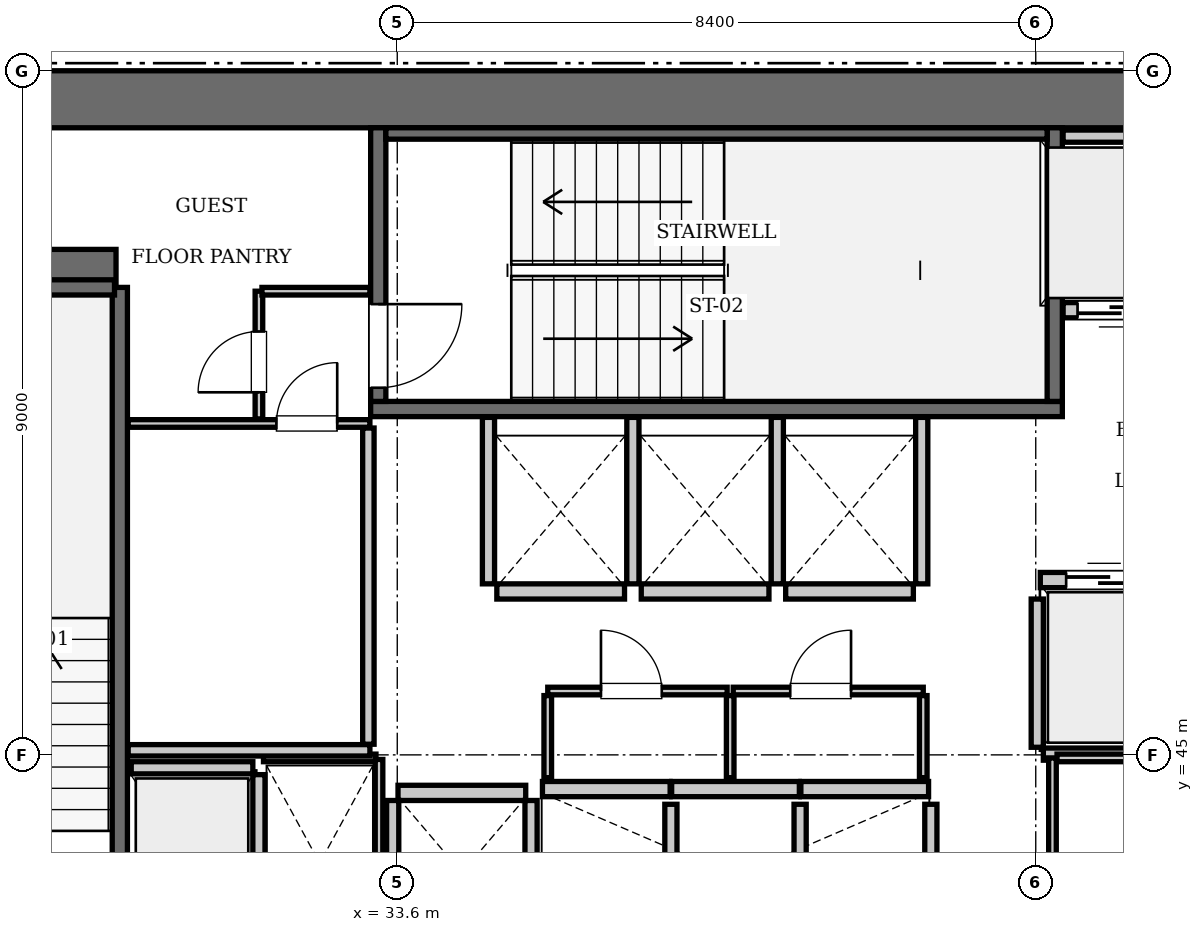
"""IFC4 building model, lengths in metres.
Left out: names, types, materials, properties, quantities, classifications, styles, units other than length and angle.
Written with IfcOpenShell. Run it as: python <this file> out.ifc"""

import sys

from ifc_helpers import new_model, si_unit, direction, frame, frame_2d, origin, place, context, subcontext, project, spatial, rectangle, extrude, element, fill, save


model = new_model("IFC4")
c1 = context("Model", 3, precision=1e-05, world=origin(), true_north=direction((0.0, 1.0)))
c2 = subcontext(c1, "Body", "Model", "MODEL_VIEW")
j1 = project(units=[si_unit("LENGTHUNIT", "METRE"), si_unit("PLANEANGLEUNIT", "RADIAN")], contexts=[c1])
p1 = place(None, origin())
s1 = spatial("IfcSite", under=j1, at=p1, CompositionType="ELEMENT")
p2 = place(p1, origin())
s2 = spatial("IfcBuilding", under=s1, at=p2, CompositionType="ELEMENT")
p3 = place(p2, frame((0.0, 0.0, 169.75)))
s3 = spatial("IfcBuildingStorey", under=s2, at=p3, CompositionType="ELEMENT", Elevation=169.75)
p4 = place(p3, frame((25.2, 53.625, 0.0), z_axis=(0.0, 0.0, 1.0), x_axis=(1.0, 0.0, 0.0)))
e1 = element("IfcWall", 1, at=p4, inside=s3, PredefinedType="SHEAR", context=c2, shape_type="SweptSolid", body=[
    extrude(rectangle(XDim=25.2, YDim=0.75, at=frame_2d((12.6, 0.0))), origin(), (0.0, 0.0, 1.0), 3.85),
])
p5 = place(p3, frame((25.95, 51.4, 0.0), z_axis=(0.0, 0.0, 1.0), x_axis=(1.0, 0.0, 0.0)))
e2 = element("IfcWall", 2, at=p5, inside=s3, PredefinedType="SHEAR", context=c2, shape_type="SweptSolid", body=[
    extrude(rectangle(XDim=3.95, YDim=0.5, at=frame_2d((1.975, 0.0))), origin(), (0.0, 0.0, 1.0), 3.85),
])
p6 = place(p3, frame((29.95, 42.15, 0.0), z_axis=(0.0, 0.0, 1.0), x_axis=(0.0, 1.0, 0.0)))
e3 = element("IfcWall", 3, at=p6, inside=s3, PredefinedType="SOLIDWALL", context=c2, shape_type="SweptSolid", body=[
    extrude(rectangle(XDim=9.0, YDim=0.2, at=frame_2d((4.5, 0.0))), origin(), (0.0, 0.0, 1.0), 3.61),
])
p7 = place(p3, frame((26.38, 51.15, 0.0), z_axis=(0.0, 0.0, 1.0), x_axis=(1.0, 0.0, 0.0)))
e4 = element("IfcWall", 4, at=p7, inside=s3, PredefinedType="SOLIDWALL", context=c2, shape_type="SweptSolid", body=[
    extrude(rectangle(XDim=3.5, YDim=0.2, at=frame_2d((1.75, 0.0))), origin(), (0.0, 0.0, 1.0), 3.61),
])
p8 = place(p3, frame((33.25, 49.55, 0.0), z_axis=(0.0, 0.0, 1.0), x_axis=(1.0, 0.0, 0.0)))
e5 = element("IfcWall", 5, at=p8, inside=s3, PredefinedType="SOLIDWALL", context=c2, shape_type="SweptSolid", body=[
    extrude(rectangle(XDim=9.1, YDim=0.2, at=frame_2d((4.55, 0.0))), origin(), (0.0, 0.0, 1.0), 3.61),
])
p9 = place(p3, frame((42.25, 49.65, 0.0), z_axis=(0.0, 0.0, 1.0), x_axis=(0.0, 1.0, 0.0)))
e6 = element("IfcWall", 6, at=p9, inside=s3, PredefinedType="SOLIDWALL", context=c2, shape_type="SweptSolid", body=[
    extrude(rectangle(XDim=3.6, YDim=0.2, at=frame_2d((1.8, 0.0))), origin(), (0.0, 0.0, 1.0), 3.61),
])
p10 = place(p3, frame((33.35, 49.65, 0.0), z_axis=(0.0, 0.0, 1.0), x_axis=(0.0, 1.0, 0.0)))
e7 = element("IfcWall", 7, at=p10, inside=s3, PredefinedType="SOLIDWALL", context=c2, shape_type="SweptSolid", body=[
    extrude(rectangle(XDim=3.6, YDim=0.2, at=frame_2d((1.8, 0.0))), origin(), (0.0, 0.0, 1.0), 3.61),
])
p11 = place(p10, frame((0.18, 0.0, 0.0)))
e8 = element("IfcOpeningElement", 8, at=p11, cuts=e7, PredefinedType="OPENING", context=c2, shape_type="SweptSolid", body=[
    extrude(rectangle(XDim=1.1, YDim=2.15, at=frame_2d((0.55, 1.075))), frame((0.0, 0.11, 0.0), z_axis=(0.0, -1.0, 0.0), x_axis=(1.0, 0.0, 0.0)), (0.0, 0.0, 1.0), 0.22),
])
p12 = place(p3, frame((33.45, 53.175, 0.0), z_axis=(0.0, 0.0, 1.0), x_axis=(1.0, 0.0, 0.0)))
e9 = element("IfcWall", 9, at=p12, inside=s3, PredefinedType="SOLIDWALL", context=c2, shape_type="SweptSolid", body=[
    extrude(rectangle(XDim=8.7, YDim=0.15, at=frame_2d((4.35, 0.0))), origin(), (0.0, 0.0, 1.0), 3.61),
])
p13 = place(p3, frame((42.06, 47.3, 0.0), z_axis=(0.0, 0.0, 1.0), x_axis=(1.0, 0.0, 0.0)))
e10 = element("IfcWall", 10, at=p13, inside=s3, PredefinedType="SOLIDWALL", context=c2, shape_type="SweptSolid", body=[
    extrude(rectangle(XDim=1.68, YDim=0.2, at=frame_2d((0.84, 0.0))), origin(), (0.0, 0.0, 1.0), 3.61),
])
p14 = place(p13, frame((0.34, 0.0, 0.0)))
e11 = element("IfcOpeningElement", 11, at=p14, cuts=e10, PredefinedType="OPENING", context=c2, shape_type="SweptSolid", body=[
    extrude(rectangle(XDim=1.0, YDim=2.15, at=frame_2d((0.5, 1.075))), frame((0.0, 0.11, 0.0), z_axis=(0.0, -1.0, 0.0), x_axis=(1.0, 0.0, 0.0)), (0.0, 0.0, 1.0), 0.22),
])
p15 = place(p3, frame((42.36, 50.85, 0.0), z_axis=(0.0, 0.0, 1.0), x_axis=(1.0, 0.0, 0.0)))
e12 = element("IfcWall", 12, at=p15, inside=s3, PredefinedType="SOLIDWALL", context=c2, shape_type="SweptSolid", body=[
    extrude(rectangle(XDim=1.38, YDim=0.2, at=frame_2d((0.69, 0.0))), origin(), (0.0, 0.0, 1.0), 3.61),
])
p16 = place(p15, frame((0.19, 0.0, 0.0)))
e13 = element("IfcOpeningElement", 13, at=p16, cuts=e12, PredefinedType="OPENING", context=c2, shape_type="SweptSolid", body=[
    extrude(rectangle(XDim=1.0, YDim=2.15, at=frame_2d((0.5, 1.075))), frame((0.0, 0.11, 0.0), z_axis=(0.0, -1.0, 0.0), x_axis=(1.0, 0.0, 0.0)), (0.0, 0.0, 1.0), 0.22),
])
for number, where, z_axis, x_axis in (
    (14, (35.51, 44.55, 0.0), (0.0, 0.0, 1.0), (1.0, 0.0, 0.0)),
    (15, (37.21, 44.55, 0.0), (0.0, 0.0, 1.0), (1.0, 0.0, 0.0)),
):
    element("IfcWall", number, at=place(p3, frame(where, z_axis=z_axis, x_axis=x_axis)), inside=s3, PredefinedType="SOLIDWALL", context=c2, shape_type="SweptSolid", body=[
        extrude(rectangle(XDim=1.68, YDim=0.2, at=frame_2d((0.84, 0.0))), origin(), (0.0, 0.0, 1.0), 3.61),
    ])
for number, where, z_axis, x_axis in (
    (16, (38.91, 44.55, 0.0), (0.0, 0.0, 1.0), (1.0, 0.0, 0.0)),
    (17, (34.91, 47.15, 0.0), (0.0, 0.0, 1.0), (1.0, 0.0, 0.0)),
):
    element("IfcWall", number, at=place(p3, frame(where, z_axis=z_axis, x_axis=x_axis)), inside=s3, PredefinedType="SOLIDWALL", context=c2, shape_type="SweptSolid", body=[
        extrude(rectangle(XDim=1.68, YDim=0.2, at=frame_2d((0.84, 0.0))), origin(), (0.0, 0.0, 1.0), 3.61),
    ])
for number, where, z_axis, x_axis in (
    (18, (36.81, 47.15, 0.0), (0.0, 0.0, 1.0), (1.0, 0.0, 0.0)),
    (19, (38.71, 47.15, 0.0), (0.0, 0.0, 1.0), (1.0, 0.0, 0.0)),
    (20, (33.61, 44.5, 0.0), (0.0, 0.0, 1.0), (1.0, 0.0, 0.0)),
):
    element("IfcWall", number, at=place(p3, frame(where, z_axis=z_axis, x_axis=x_axis)), inside=s3, PredefinedType="SOLIDWALL", context=c2, shape_type="SweptSolid", body=[
        extrude(rectangle(XDim=1.68, YDim=0.2, at=frame_2d((0.84, 0.0))), origin(), (0.0, 0.0, 1.0), 3.61),
    ])
p17 = place(p3, frame((30.1, 44.83, 0.0), z_axis=(0.0, 0.0, 1.0), x_axis=(1.0, 0.0, 0.0)))
e21 = element("IfcWall", 21, at=p17, inside=s3, PredefinedType="SOLIDWALL", context=c2, shape_type="SweptSolid", body=[
    extrude(rectangle(XDim=1.6, YDim=0.16, at=frame_2d((0.8, 0.0))), origin(), (0.0, 0.0, 1.0), 3.61),
])
p18 = place(p3, frame((31.78, 42.15, 0.0), z_axis=(0.0, 0.0, 1.0), x_axis=(0.0, 1.0, 0.0)))
e22 = element("IfcWall", 22, at=p18, inside=s3, PredefinedType="SOLIDWALL", context=c2, shape_type="SweptSolid", body=[
    extrude(rectangle(XDim=2.59, YDim=0.16, at=frame_2d((1.295, 0.0))), origin(), (0.0, 0.0, 1.0), 3.61),
])
p19 = place(p3, frame((42.02, 45.1, 0.0), z_axis=(0.0, 0.0, 1.0), x_axis=(0.0, 1.0, 0.0)))
e23 = element("IfcWall", 23, at=p19, inside=s3, PredefinedType="SOLIDWALL", context=c2, shape_type="SweptSolid", body=[
    extrude(rectangle(XDim=1.95, YDim=0.16, at=frame_2d((0.975, 0.0))), origin(), (0.0, 0.0, 1.0), 3.61),
])
p20 = place(p3, frame((42.1, 45.01, 0.0), z_axis=(0.0, 0.0, 1.0), x_axis=(1.0, 0.0, 0.0)))
e24 = element("IfcWall", 24, at=p20, inside=s3, PredefinedType="SOLIDWALL", context=c2, shape_type="SweptSolid", body=[
    extrude(rectangle(XDim=3.45, YDim=0.16, at=frame_2d((1.725, 0.0))), origin(), (0.0, 0.0, 1.0), 3.61),
])
p21 = place(p3, frame((42.36, 53.14, 0.0), z_axis=(0.0, 0.0, 1.0), x_axis=(1.0, 0.0, 0.0)))
e25 = element("IfcWall", 25, at=p21, inside=s3, PredefinedType="SOLIDWALL", context=c2, shape_type="SweptSolid", body=[
    extrude(rectangle(XDim=3.14, YDim=0.16, at=frame_2d((1.57, 0.0))), origin(), (0.0, 0.0, 1.0), 3.61),
])
for number, where, z_axis, x_axis in (
    (26, (37.2, 42.15, 0.0), (0.0, 0.0, 1.0), (0.0, 1.0, 0.0)),
    (27, (38.9, 42.15, 0.0), (0.0, 0.0, 1.0), (0.0, 1.0, 0.0)),
    (28, (40.62, 42.15, 0.0), (0.0, 0.0, 1.0), (0.0, 1.0, 0.0)),
):
    element("IfcWall", number, at=place(p3, frame(where, z_axis=z_axis, x_axis=x_axis)), inside=s3, PredefinedType="SOLIDWALL", context=c2, shape_type="SweptSolid", body=[
        extrude(rectangle(XDim=2.2, YDim=0.16, at=frame_2d((1.1, 0.0))), origin(), (0.0, 0.0, 1.0), 3.61),
    ])
for number, where, z_axis, x_axis in (
    (29, (34.8, 47.25, 0.0), (0.0, 0.0, 1.0), (0.0, 1.0, 0.0)),
    (30, (36.7, 47.25, 0.0), (0.0, 0.0, 1.0), (0.0, 1.0, 0.0)),
    (31, (38.6, 47.25, 0.0), (0.0, 0.0, 1.0), (0.0, 1.0, 0.0)),
    (32, (40.5, 47.25, 0.0), (0.0, 0.0, 1.0), (0.0, 1.0, 0.0)),
):
    element("IfcWall", number, at=place(p3, frame(where, z_axis=z_axis, x_axis=x_axis)), inside=s3, PredefinedType="SOLIDWALL", context=c2, shape_type="SweptSolid", body=[
        extrude(rectangle(XDim=2.19, YDim=0.16, at=frame_2d((1.095, 0.0))), origin(), (0.0, 0.0, 1.0), 3.61),
    ])
for number, where, z_axis, x_axis in (
    (33, (33.54, 42.15, 0.0), (0.0, 0.0, 1.0), (0.0, 1.0, 0.0)),
    (34, (35.36, 42.15, 0.0), (0.0, 0.0, 1.0), (0.0, 1.0, 0.0)),
):
    element("IfcWall", number, at=place(p3, frame(where, z_axis=z_axis, x_axis=x_axis)), inside=s3, PredefinedType="SOLIDWALL", context=c2, shape_type="SweptSolid", body=[
        extrude(rectangle(XDim=2.25, YDim=0.16, at=frame_2d((1.125, 0.0))), origin(), (0.0, 0.0, 1.0), 3.61),
    ])
p22 = place(p3, frame((31.84, 44.96, 0.0), z_axis=(0.0, 0.0, 1.0), x_axis=(1.0, 0.0, 0.0)))
e35 = element("IfcWall", 35, at=p22, inside=s3, PredefinedType="PARTITIONING", context=c2, shape_type="SweptSolid", body=[
    extrude(rectangle(XDim=1.48, YDim=0.1, at=frame_2d((0.74, 0.0))), origin(), (0.0, 0.0, 1.0), 3.61),
])
p23 = place(p3, frame((33.36, 42.21, 0.0), z_axis=(0.0, 0.0, 1.0), x_axis=(0.0, 1.0, 0.0)))
e36 = element("IfcWall", 36, at=p23, inside=s3, PredefinedType="PARTITIONING", context=c2, shape_type="SweptSolid", body=[
    extrude(rectangle(XDim=2.73, YDim=0.1, at=frame_2d((1.365, 0.0))), origin(), (0.0, 0.0, 1.0), 3.61),
])
p24 = place(p3, frame((35.58, 45.84, 0.0), z_axis=(0.0, 0.0, 1.0), x_axis=(1.0, 0.0, 0.0)))
e37 = element("IfcWall", 37, at=p24, inside=s3, PredefinedType="PARTITIONING", context=c2, shape_type="SweptSolid", body=[
    extrude(rectangle(XDim=2.36, YDim=0.1, at=frame_2d((1.18, 0.0))), origin(), (0.0, 0.0, 1.0), 3.61),
])
p25 = place(p24, frame((0.7, 0.0, 0.0)))
e38 = element("IfcOpeningElement", 38, at=p25, cuts=e37, PredefinedType="OPENING", context=c2, shape_type="SweptSolid", body=[
    extrude(rectangle(XDim=0.8, YDim=2.05, at=frame_2d((0.4, 1.025))), frame((0.0, 0.06, 0.0), z_axis=(0.0, -1.0, 0.0), x_axis=(1.0, 0.0, 0.0)), (0.0, 0.0, 1.0), 0.12),
])
p26 = place(p3, frame((38.02, 45.84, 0.0), z_axis=(0.0, 0.0, 1.0), x_axis=(1.0, 0.0, 0.0)))
e39 = element("IfcWall", 39, at=p26, inside=s3, PredefinedType="PARTITIONING", context=c2, shape_type="SweptSolid", body=[
    extrude(rectangle(XDim=2.5, YDim=0.1, at=frame_2d((1.25, 0.0))), origin(), (0.0, 0.0, 1.0), 3.61),
])
p27 = place(p26, frame((0.75, 0.0, 0.0)))
e40 = element("IfcOpeningElement", 40, at=p27, cuts=e39, PredefinedType="OPENING", context=c2, shape_type="SweptSolid", body=[
    extrude(rectangle(XDim=0.8, YDim=2.05, at=frame_2d((0.4, 1.025))), frame((0.0, 0.06, 0.0), z_axis=(0.0, -1.0, 0.0), x_axis=(1.0, 0.0, 0.0)), (0.0, 0.0, 1.0), 0.12),
])
for number, where, z_axis, x_axis in (
    (41, (35.58, 44.7, 0.0), (0.0, 0.0, 1.0), (0.0, 1.0, 0.0)),
    (42, (37.98, 44.7, 0.0), (0.0, 0.0, 1.0), (0.0, 1.0, 0.0)),
    (43, (40.52, 44.7, 0.0), (0.0, 0.0, 1.0), (0.0, 1.0, 0.0)),
):
    element("IfcWall", number, at=place(p3, frame(where, z_axis=z_axis, x_axis=x_axis)), inside=s3, PredefinedType="PARTITIONING", context=c2, shape_type="SweptSolid", body=[
        extrude(rectangle(XDim=1.08, YDim=0.1, at=frame_2d((0.54, 0.0))), origin(), (0.0, 0.0, 1.0), 3.61),
    ])
p28 = place(p3, frame((42.22, 42.2, 0.0), z_axis=(0.0, 0.0, 1.0), x_axis=(0.0, 1.0, 0.0)))
e44 = element("IfcWall", 44, at=p28, inside=s3, PredefinedType="PARTITIONING", context=c2, shape_type="SweptSolid", body=[
    extrude(rectangle(XDim=2.76, YDim=0.1, at=frame_2d((1.38, 0.0))), origin(), (0.0, 0.0, 1.0), 3.61),
])
p29 = place(p28, frame((0.65, 0.0, 0.0)))
e45 = element("IfcOpeningElement", 45, at=p29, cuts=e44, PredefinedType="OPENING", context=c2, shape_type="SweptSolid", body=[
    extrude(rectangle(XDim=0.8, YDim=2.05, at=frame_2d((0.4, 1.025))), frame((0.0, 0.06, 0.0), z_axis=(0.0, -1.0, 0.0), x_axis=(1.0, 0.0, 0.0)), (0.0, 0.0, 1.0), 0.12),
])
p30 = place(p3, frame((42.28, 44.96, 0.0), z_axis=(0.0, 0.0, 1.0), x_axis=(1.0, 0.0, 0.0)))
e46 = element("IfcWall", 46, at=p30, inside=s3, PredefinedType="PARTITIONING", context=c2, shape_type="SweptSolid", body=[
    extrude(rectangle(XDim=1.3, YDim=0.1, at=frame_2d((0.65, 0.0))), origin(), (0.0, 0.0, 1.0), 3.61),
])
p31 = place(p3, frame((30.06, 45.06, 0.0), z_axis=(0.0, 0.0, 1.0), x_axis=(1.0, 0.0, 0.0)))
e47 = element("IfcWall", 47, at=p31, inside=s3, PredefinedType="PARTITIONING", context=c2, shape_type="SweptSolid", body=[
    extrude(rectangle(XDim=3.18, YDim=0.15, at=frame_2d((1.59, 0.0))), origin(), (0.0, 0.0, 1.0), 3.61),
])
p32 = place(p3, frame((33.22, 45.14, 0.0), z_axis=(0.0, 0.0, 1.0), x_axis=(0.0, 1.0, 0.0)))
e48 = element("IfcWall", 48, at=p32, inside=s3, PredefinedType="PARTITIONING", context=c2, shape_type="SweptSolid", body=[
    extrude(rectangle(XDim=4.16, YDim=0.15, at=frame_2d((2.08, 0.0))), origin(), (0.0, 0.0, 1.0), 3.61),
])
p33 = place(p3, frame((30.06, 49.36, 0.0), z_axis=(0.0, 0.0, 1.0), x_axis=(1.0, 0.0, 0.0)))
e49 = element("IfcWall", 49, at=p33, inside=s3, PredefinedType="PARTITIONING", context=c2, shape_type="SweptSolid", body=[
    extrude(rectangle(XDim=3.18, YDim=0.1, at=frame_2d((1.59, 0.0))), origin(), (0.0, 0.0, 1.0), 3.61),
])
p34 = place(p33, frame((1.95, 0.0, 0.0)))
e50 = element("IfcOpeningElement", 50, at=p34, cuts=e49, PredefinedType="OPENING", context=c2, shape_type="SweptSolid", body=[
    extrude(rectangle(XDim=0.8, YDim=2.05, at=frame_2d((0.4, 1.025))), frame((0.0, 0.06, 0.0), z_axis=(0.0, -1.0, 0.0), x_axis=(1.0, 0.0, 0.0)), (0.0, 0.0, 1.0), 0.12),
])
p35 = place(p3, frame((31.78, 49.42, 0.0), z_axis=(0.0, 0.0, 1.0), x_axis=(0.0, 1.0, 0.0)))
e51 = element("IfcWall", 51, at=p35, inside=s3, PredefinedType="PARTITIONING", context=c2, shape_type="SweptSolid", body=[
    extrude(rectangle(XDim=1.68, YDim=0.1, at=frame_2d((0.84, 0.0))), origin(), (0.0, 0.0, 1.0), 3.61),
])
p36 = place(p35, frame((0.35, 0.0, 0.0)))
e52 = element("IfcOpeningElement", 52, at=p36, cuts=e51, PredefinedType="OPENING", context=c2, shape_type="SweptSolid", body=[
    extrude(rectangle(XDim=0.8, YDim=2.05, at=frame_2d((0.4, 1.025))), frame((0.0, 0.06, 0.0), z_axis=(0.0, -1.0, 0.0), x_axis=(1.0, 0.0, 0.0)), (0.0, 0.0, 1.0), 0.12),
])
p37 = place(p3, frame((31.82, 51.1, 0.0), z_axis=(0.0, 0.0, 1.0), x_axis=(1.0, 0.0, 0.0)))
e53 = element("IfcWall", 53, at=p37, inside=s3, PredefinedType="PARTITIONING", context=c2, shape_type="SweptSolid", body=[
    extrude(rectangle(XDim=1.42, YDim=0.1, at=frame_2d((0.71, 0.0))), origin(), (0.0, 0.0, 1.0), 3.61),
])
p38 = place(p11, frame((1.1, 0.0, 0.0), z_axis=(0.0, 0.0, 1.0), x_axis=(-1.0, 0.0, 0.0)))
e54 = element("IfcDoor", 54, at=p38, inside=s3, OperationType="SINGLE_SWING_LEFT", PredefinedType="DOOR", context=c2, shape_type="SweptSolid", body=[
    extrude(rectangle(XDim=1.1, YDim=2.15, at=frame_2d((0.55, 1.075))), frame((0.0, 0.025, 0.0), z_axis=(0.0, -1.0, 0.0), x_axis=(1.0, 0.0, 0.0)), (0.0, 0.0, 1.0), 0.05),
])
fill(e8, e54)
p39 = place(p14, origin())
e55 = element("IfcDoor", 55, at=p39, inside=s3, OperationType="SLIDING_TO_LEFT", PredefinedType="DOOR", context=c2, shape_type="SweptSolid", body=[
    extrude(rectangle(XDim=1.0, YDim=2.15, at=frame_2d((0.5, 1.075))), frame((0.0, 0.025, 0.0), z_axis=(0.0, -1.0, 0.0), x_axis=(1.0, 0.0, 0.0)), (0.0, 0.0, 1.0), 0.05),
])
fill(e11, e55)
p40 = place(p16, frame((1.0, 0.0, 0.0), z_axis=(0.0, 0.0, 1.0), x_axis=(-1.0, 0.0, 0.0)))
e56 = element("IfcDoor", 56, at=p40, inside=s3, OperationType="SLIDING_TO_LEFT", PredefinedType="DOOR", context=c2, shape_type="SweptSolid", body=[
    extrude(rectangle(XDim=1.0, YDim=2.15, at=frame_2d((0.5, 1.075))), frame((0.0, 0.025, 0.0), z_axis=(0.0, -1.0, 0.0), x_axis=(1.0, 0.0, 0.0)), (0.0, 0.0, 1.0), 0.05),
])
fill(e13, e56)
p41 = place(p25, origin())
e57 = element("IfcDoor", 57, at=p41, inside=s3, OperationType="SINGLE_SWING_LEFT", PredefinedType="DOOR", context=c2, shape_type="SweptSolid", body=[
    extrude(rectangle(XDim=0.8, YDim=2.05, at=frame_2d((0.4, 1.025))), frame((0.0, 0.025, 0.0), z_axis=(0.0, -1.0, 0.0), x_axis=(1.0, 0.0, 0.0)), (0.0, 0.0, 1.0), 0.05),
])
fill(e38, e57)
p42 = place(p27, origin())
e58 = element("IfcDoor", 58, at=p42, inside=s3, OperationType="SINGLE_SWING_RIGHT", PredefinedType="DOOR", context=c2, shape_type="SweptSolid", body=[
    extrude(rectangle(XDim=0.8, YDim=2.05, at=frame_2d((0.4, 1.025))), frame((0.0, 0.025, 0.0), z_axis=(0.0, -1.0, 0.0), x_axis=(1.0, 0.0, 0.0)), (0.0, 0.0, 1.0), 0.05),
])
fill(e40, e58)
p43 = place(p34, origin())
e59 = element("IfcDoor", 59, at=p43, inside=s3, OperationType="SINGLE_SWING_RIGHT", PredefinedType="DOOR", context=c2, shape_type="SweptSolid", body=[
    extrude(rectangle(XDim=0.8, YDim=2.05, at=frame_2d((0.4, 1.025))), frame((0.0, 0.025, 0.0), z_axis=(0.0, -1.0, 0.0), x_axis=(1.0, 0.0, 0.0)), (0.0, 0.0, 1.0), 0.05),
])
fill(e50, e59)
p44 = place(p36, origin())
e60 = element("IfcDoor", 60, at=p44, inside=s3, OperationType="SINGLE_SWING_LEFT", PredefinedType="DOOR", context=c2, shape_type="SweptSolid", body=[
    extrude(rectangle(XDim=0.8, YDim=2.05, at=frame_2d((0.4, 1.025))), frame((0.0, 0.025, 0.0), z_axis=(0.0, -1.0, 0.0), x_axis=(1.0, 0.0, 0.0)), (0.0, 0.0, 1.0), 0.05),
])
fill(e52, e60)
save(model, sys.argv[1])
